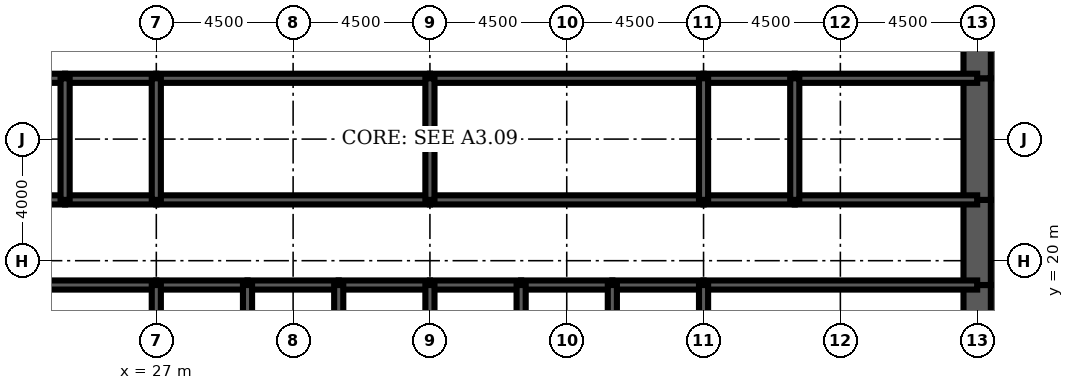
"""IFC4 building model, lengths in metres.
Left out: names, types, materials, properties, quantities, classifications, styles, units other than length and angle.
Written with IfcOpenShell. Run it as: python <this file> out.ifc"""

import sys

from ifc_helpers import new_model, si_unit, direction, frame, frame_2d, origin, place, context, subcontext, project, spatial, rectangle, extrude, element, fill, save


model = new_model("IFC4")
c1 = context("Model", 3, precision=1e-05, world=origin(), true_north=direction((0.0, 1.0)))
c2 = subcontext(c1, "Body", "Model", "MODEL_VIEW")
j1 = project(units=[si_unit("LENGTHUNIT", "METRE"), si_unit("PLANEANGLEUNIT", "RADIAN")], contexts=[c1])
p1 = place(None, origin())
s1 = spatial("IfcSite", under=j1, at=p1, CompositionType="ELEMENT")
p2 = place(p1, origin())
s2 = spatial("IfcBuilding", under=s1, at=p2, CompositionType="ELEMENT")
p3 = place(p2, frame((0.0, 0.0, 36.5)))
s3 = spatial("IfcBuildingStorey", under=s2, at=p3, CompositionType="ELEMENT", Elevation=36.5)
p4 = place(p3, frame((54.0, 16.0, 0.0), z_axis=(0.0, 0.0, 1.0), x_axis=(0.0, 1.0, 0.0)))
e1 = element("IfcWall", 1, at=p4, inside=s3, PredefinedType="SHEAR", context=c2, shape_type="SweptSolid", body=[
    extrude(rectangle(XDim=3.2, YDim=0.9, at=frame_2d((1.6, 0.0))), origin(), (0.0, 0.0, 1.0), 4.5),
])
p5 = place(p3, frame((54.0, 19.2, 0.0), z_axis=(0.0, 0.0, 1.0), x_axis=(0.0, 1.0, 0.0)))
e2 = element("IfcWall", 2, at=p5, inside=s3, PredefinedType="SHEAR", context=c2, shape_type="SweptSolid", body=[
    extrude(rectangle(XDim=2.8, YDim=0.9, at=frame_2d((1.4, 0.0))), origin(), (0.0, 0.0, 1.0), 4.5),
])
p6 = place(p5, frame((0.4, 0.0, 0.0)))
e3 = element("IfcOpeningElement", 3, at=p6, cuts=e2, PredefinedType="OPENING", context=c2, shape_type="SweptSolid", body=[
    extrude(rectangle(XDim=1.8, YDim=2.1, at=frame_2d((0.9, 1.05))), frame((0.0, 0.46, 0.0), z_axis=(0.0, -1.0, 0.0), x_axis=(1.0, 0.0, 0.0)), (0.0, 0.0, 1.0), 0.92),
])
p7 = place(p3, frame((54.0, 22.0, 0.0), z_axis=(0.0, 0.0, 1.0), x_axis=(0.0, 1.0, 0.0)))
e4 = element("IfcWall", 4, at=p7, inside=s3, PredefinedType="SHEAR", context=c2, shape_type="SweptSolid", body=[
    extrude(rectangle(XDim=4.0, YDim=0.9, at=frame_2d((2.0, 0.0))), origin(), (0.0, 0.0, 1.0), 4.5),
])
p8 = place(p3, frame((54.0, 26.0, 0.0), z_axis=(0.0, 0.0, 1.0), x_axis=(0.0, 1.0, 0.0)))
e5 = element("IfcWall", 5, at=p8, inside=s3, PredefinedType="SHEAR", context=c2, shape_type="SweptSolid", body=[
    extrude(rectangle(XDim=2.8, YDim=0.9, at=frame_2d((1.4, 0.0))), origin(), (0.0, 0.0, 1.0), 4.5),
])
p9 = place(p8, frame((0.6, 0.0, 0.0)))
e6 = element("IfcOpeningElement", 6, at=p9, cuts=e5, PredefinedType="OPENING", context=c2, shape_type="SweptSolid", body=[
    extrude(rectangle(XDim=1.8, YDim=2.1, at=frame_2d((0.9, 1.05))), frame((0.0, 0.46, 0.0), z_axis=(0.0, -1.0, 0.0), x_axis=(1.0, 0.0, 0.0)), (0.0, 0.0, 1.0), 0.92),
])
p10 = place(p3, frame((18.0, 19.2, 0.0), z_axis=(0.0, 0.0, 1.0), x_axis=(1.0, 0.0, 0.0)))
e7 = element("IfcWall", 7, at=p10, inside=s3, PredefinedType="SOLIDWALL", context=c2, shape_type="SweptSolid", body=[
    extrude(rectangle(XDim=9.0, YDim=0.3, at=frame_2d((4.5, 0.0))), origin(), (0.0, 0.0, 1.0), 4.5),
])
p11 = place(p10, frame((0.65, 0.0, 0.0)))
e8 = element("IfcOpeningElement", 8, at=p11, cuts=e7, PredefinedType="OPENING", context=c2, shape_type="SweptSolid", body=[
    extrude(rectangle(XDim=1.0, YDim=2.1, at=frame_2d((0.5, 1.05))), frame((0.0, 0.16, 0.0), z_axis=(0.0, -1.0, 0.0), x_axis=(1.0, 0.0, 0.0)), (0.0, 0.0, 1.0), 0.32),
])
p12 = place(p3, frame((27.0, 19.2, 0.0), z_axis=(0.0, 0.0, 1.0), x_axis=(1.0, 0.0, 0.0)))
e9 = element("IfcWall", 9, at=p12, inside=s3, PredefinedType="SOLIDWALL", context=c2, shape_type="SweptSolid", body=[
    extrude(rectangle(XDim=3.0, YDim=0.3, at=frame_2d((1.5, 0.0))), origin(), (0.0, 0.0, 1.0), 4.5),
])
p13 = place(p12, frame((0.95, 0.0, 0.0)))
e10 = element("IfcOpeningElement", 10, at=p13, cuts=e9, PredefinedType="OPENING", context=c2, shape_type="SweptSolid", body=[
    extrude(rectangle(XDim=1.1, YDim=2.2, at=frame_2d((0.55, 1.1))), frame((0.0, 0.16, 0.0), z_axis=(0.0, -1.0, 0.0), x_axis=(1.0, 0.0, 0.0)), (0.0, 0.0, 1.0), 0.32),
])
p14 = place(p3, frame((30.0, 19.2, 0.0), z_axis=(0.0, 0.0, 1.0), x_axis=(1.0, 0.0, 0.0)))
e11 = element("IfcWall", 11, at=p14, inside=s3, PredefinedType="SOLIDWALL", context=c2, shape_type="SweptSolid", body=[
    extrude(rectangle(XDim=3.0, YDim=0.3, at=frame_2d((1.5, 0.0))), origin(), (0.0, 0.0, 1.0), 4.5),
])
p15 = place(p14, frame((0.95, 0.0, 0.0)))
e12 = element("IfcOpeningElement", 12, at=p15, cuts=e11, PredefinedType="OPENING", context=c2, shape_type="SweptSolid", body=[
    extrude(rectangle(XDim=1.1, YDim=2.2, at=frame_2d((0.55, 1.1))), frame((0.0, 0.16, 0.0), z_axis=(0.0, -1.0, 0.0), x_axis=(1.0, 0.0, 0.0)), (0.0, 0.0, 1.0), 0.32),
])
p16 = place(p3, frame((33.0, 19.2, 0.0), z_axis=(0.0, 0.0, 1.0), x_axis=(1.0, 0.0, 0.0)))
e13 = element("IfcWall", 13, at=p16, inside=s3, PredefinedType="SOLIDWALL", context=c2, shape_type="SweptSolid", body=[
    extrude(rectangle(XDim=3.0, YDim=0.3, at=frame_2d((1.5, 0.0))), origin(), (0.0, 0.0, 1.0), 4.5),
])
p17 = place(p16, frame((0.95, 0.0, 0.0)))
e14 = element("IfcOpeningElement", 14, at=p17, cuts=e13, PredefinedType="OPENING", context=c2, shape_type="SweptSolid", body=[
    extrude(rectangle(XDim=1.1, YDim=2.2, at=frame_2d((0.55, 1.1))), frame((0.0, 0.16, 0.0), z_axis=(0.0, -1.0, 0.0), x_axis=(1.0, 0.0, 0.0)), (0.0, 0.0, 1.0), 0.32),
])
p18 = place(p3, frame((36.0, 19.2, 0.0), z_axis=(0.0, 0.0, 1.0), x_axis=(1.0, 0.0, 0.0)))
e15 = element("IfcWall", 15, at=p18, inside=s3, PredefinedType="SOLIDWALL", context=c2, shape_type="SweptSolid", body=[
    extrude(rectangle(XDim=3.0, YDim=0.3, at=frame_2d((1.5, 0.0))), origin(), (0.0, 0.0, 1.0), 4.5),
])
p19 = place(p18, frame((0.95, 0.0, 0.0)))
e16 = element("IfcOpeningElement", 16, at=p19, cuts=e15, PredefinedType="OPENING", context=c2, shape_type="SweptSolid", body=[
    extrude(rectangle(XDim=1.1, YDim=2.2, at=frame_2d((0.55, 1.1))), frame((0.0, 0.16, 0.0), z_axis=(0.0, -1.0, 0.0), x_axis=(1.0, 0.0, 0.0)), (0.0, 0.0, 1.0), 0.32),
])
for number, where, z_axis, x_axis in (
    (17, (39.0, 19.2, 0.0), (0.0, 0.0, 1.0), (1.0, 0.0, 0.0)),
    (18, (42.0, 19.2, 0.0), (0.0, 0.0, 1.0), (1.0, 0.0, 0.0)),
):
    element("IfcWall", number, at=place(p3, frame(where, z_axis=z_axis, x_axis=x_axis)), inside=s3, PredefinedType="SOLIDWALL", context=c2, shape_type="SweptSolid", body=[
        extrude(rectangle(XDim=3.0, YDim=0.3, at=frame_2d((1.5, 0.0))), origin(), (0.0, 0.0, 1.0), 4.5),
    ])
p20 = place(p3, frame((45.0, 19.2, 0.0), z_axis=(0.0, 0.0, 1.0), x_axis=(1.0, 0.0, 0.0)))
e19 = element("IfcWall", 19, at=p20, inside=s3, PredefinedType="SOLIDWALL", context=c2, shape_type="SweptSolid", body=[
    extrude(rectangle(XDim=9.0, YDim=0.3, at=frame_2d((4.5, 0.0))), origin(), (0.0, 0.0, 1.0), 4.5),
])
p21 = place(p20, frame((7.35, 0.0, 0.0)))
e20 = element("IfcOpeningElement", 20, at=p21, cuts=e19, PredefinedType="OPENING", context=c2, shape_type="SweptSolid", body=[
    extrude(rectangle(XDim=1.0, YDim=2.1, at=frame_2d((0.5, 1.05))), frame((0.0, 0.16, 0.0), z_axis=(0.0, -1.0, 0.0), x_axis=(1.0, 0.0, 0.0)), (0.0, 0.0, 1.0), 0.32),
])
p22 = place(p3, frame((18.0, 22.0, 0.0), z_axis=(0.0, 0.0, 1.0), x_axis=(1.0, 0.0, 0.0)))
e21 = element("IfcWall", 21, at=p22, inside=s3, PredefinedType="SOLIDWALL", context=c2, shape_type="SweptSolid", body=[
    extrude(rectangle(XDim=6.0, YDim=0.3, at=frame_2d((3.0, 0.0))), origin(), (0.0, 0.0, 1.0), 4.5),
])
p23 = place(p22, frame((2.0, 0.0, 0.0)))
e22 = element("IfcOpeningElement", 22, at=p23, cuts=e21, PredefinedType="OPENING", context=c2, shape_type="SweptSolid", body=[
    extrude(rectangle(XDim=1.0, YDim=2.1, at=frame_2d((0.5, 1.05))), frame((0.0, 0.16, 0.0), z_axis=(0.0, -1.0, 0.0), x_axis=(1.0, 0.0, 0.0)), (0.0, 0.0, 1.0), 0.32),
])
p24 = place(p3, frame((24.0, 22.0, 0.0), z_axis=(0.0, 0.0, 1.0), x_axis=(1.0, 0.0, 0.0)))
e23 = element("IfcWall", 23, at=p24, inside=s3, PredefinedType="SOLIDWALL", context=c2, shape_type="SweptSolid", body=[
    extrude(rectangle(XDim=3.0, YDim=0.3, at=frame_2d((1.5, 0.0))), origin(), (0.0, 0.0, 1.0), 4.5),
])
p25 = place(p24, frame((1.0, 0.0, 0.0)))
e24 = element("IfcOpeningElement", 24, at=p25, cuts=e23, PredefinedType="OPENING", context=c2, shape_type="SweptSolid", body=[
    extrude(rectangle(XDim=1.0, YDim=2.1, at=frame_2d((0.5, 1.05))), frame((0.0, 0.16, 0.0), z_axis=(0.0, -1.0, 0.0), x_axis=(1.0, 0.0, 0.0)), (0.0, 0.0, 1.0), 0.32),
])
p26 = place(p3, frame((27.0, 22.0, 0.0), z_axis=(0.0, 0.0, 1.0), x_axis=(1.0, 0.0, 0.0)))
e25 = element("IfcWall", 25, at=p26, inside=s3, PredefinedType="SOLIDWALL", context=c2, shape_type="SweptSolid", body=[
    extrude(rectangle(XDim=9.0, YDim=0.3, at=frame_2d((4.5, 0.0))), origin(), (0.0, 0.0, 1.0), 4.5),
])
p27 = place(p26, frame((4.0, 0.0, 0.0)))
e26 = element("IfcOpeningElement", 26, at=p27, cuts=e25, PredefinedType="OPENING", context=c2, shape_type="SweptSolid", body=[
    extrude(rectangle(XDim=1.0, YDim=2.1, at=frame_2d((0.5, 1.05))), frame((0.0, 0.16, 0.0), z_axis=(0.0, -1.0, 0.0), x_axis=(1.0, 0.0, 0.0)), (0.0, 0.0, 1.0), 0.32),
])
p28 = place(p3, frame((36.0, 22.0, 0.0), z_axis=(0.0, 0.0, 1.0), x_axis=(1.0, 0.0, 0.0)))
e27 = element("IfcWall", 27, at=p28, inside=s3, PredefinedType="SOLIDWALL", context=c2, shape_type="SweptSolid", body=[
    extrude(rectangle(XDim=9.0, YDim=0.3, at=frame_2d((4.5, 0.0))), origin(), (0.0, 0.0, 1.0), 4.5),
])
p29 = place(p28, frame((4.0, 0.0, 0.0)))
e28 = element("IfcOpeningElement", 28, at=p29, cuts=e27, PredefinedType="OPENING", context=c2, shape_type="SweptSolid", body=[
    extrude(rectangle(XDim=1.0, YDim=2.1, at=frame_2d((0.5, 1.05))), frame((0.0, 0.16, 0.0), z_axis=(0.0, -1.0, 0.0), x_axis=(1.0, 0.0, 0.0)), (0.0, 0.0, 1.0), 0.32),
])
p30 = place(p3, frame((45.0, 22.0, 0.0), z_axis=(0.0, 0.0, 1.0), x_axis=(1.0, 0.0, 0.0)))
e29 = element("IfcWall", 29, at=p30, inside=s3, PredefinedType="SOLIDWALL", context=c2, shape_type="SweptSolid", body=[
    extrude(rectangle(XDim=3.0, YDim=0.3, at=frame_2d((1.5, 0.0))), origin(), (0.0, 0.0, 1.0), 4.5),
])
p31 = place(p30, frame((1.0, 0.0, 0.0)))
e30 = element("IfcOpeningElement", 30, at=p31, cuts=e29, PredefinedType="OPENING", context=c2, shape_type="SweptSolid", body=[
    extrude(rectangle(XDim=1.0, YDim=2.1, at=frame_2d((0.5, 1.05))), frame((0.0, 0.16, 0.0), z_axis=(0.0, -1.0, 0.0), x_axis=(1.0, 0.0, 0.0)), (0.0, 0.0, 1.0), 0.32),
])
p32 = place(p3, frame((48.0, 22.0, 0.0), z_axis=(0.0, 0.0, 1.0), x_axis=(1.0, 0.0, 0.0)))
e31 = element("IfcWall", 31, at=p32, inside=s3, PredefinedType="SOLIDWALL", context=c2, shape_type="SweptSolid", body=[
    extrude(rectangle(XDim=6.0, YDim=0.3, at=frame_2d((3.0, 0.0))), origin(), (0.0, 0.0, 1.0), 4.5),
])
p33 = place(p32, frame((2.0, 0.0, 0.0)))
e32 = element("IfcOpeningElement", 32, at=p33, cuts=e31, PredefinedType="OPENING", context=c2, shape_type="SweptSolid", body=[
    extrude(rectangle(XDim=1.0, YDim=2.1, at=frame_2d((0.5, 1.05))), frame((0.0, 0.16, 0.0), z_axis=(0.0, -1.0, 0.0), x_axis=(1.0, 0.0, 0.0)), (0.0, 0.0, 1.0), 0.32),
])
p34 = place(p32, frame((4.15, 0.0, 0.0)))
e33 = element("IfcOpeningElement", 33, at=p34, cuts=e31, PredefinedType="OPENING", context=c2, shape_type="SweptSolid", body=[
    extrude(rectangle(XDim=1.0, YDim=2.1, at=frame_2d((0.5, 1.05))), frame((0.0, 0.16, 0.0), z_axis=(0.0, -1.0, 0.0), x_axis=(1.0, 0.0, 0.0)), (0.0, 0.0, 1.0), 0.32),
])
p35 = place(p3, frame((18.0, 26.0, 0.0), z_axis=(0.0, 0.0, 1.0), x_axis=(1.0, 0.0, 0.0)))
e34 = element("IfcWall", 34, at=p35, inside=s3, PredefinedType="SOLIDWALL", context=c2, shape_type="SweptSolid", body=[
    extrude(rectangle(XDim=6.0, YDim=0.3, at=frame_2d((3.0, 0.0))), origin(), (0.0, 0.0, 1.0), 4.5),
])
p36 = place(p3, frame((24.0, 26.0, 0.0), z_axis=(0.0, 0.0, 1.0), x_axis=(1.0, 0.0, 0.0)))
e35 = element("IfcWall", 35, at=p36, inside=s3, PredefinedType="SOLIDWALL", context=c2, shape_type="SweptSolid", body=[
    extrude(rectangle(XDim=3.0, YDim=0.3, at=frame_2d((1.5, 0.0))), origin(), (0.0, 0.0, 1.0), 4.5),
])
for number, where, z_axis, x_axis in (
    (36, (27.0, 26.0, 0.0), (0.0, 0.0, 1.0), (1.0, 0.0, 0.0)),
    (37, (36.0, 26.0, 0.0), (0.0, 0.0, 1.0), (1.0, 0.0, 0.0)),
):
    element("IfcWall", number, at=place(p3, frame(where, z_axis=z_axis, x_axis=x_axis)), inside=s3, PredefinedType="SOLIDWALL", context=c2, shape_type="SweptSolid", body=[
        extrude(rectangle(XDim=9.0, YDim=0.3, at=frame_2d((4.5, 0.0))), origin(), (0.0, 0.0, 1.0), 4.5),
    ])
p37 = place(p3, frame((45.0, 26.0, 0.0), z_axis=(0.0, 0.0, 1.0), x_axis=(1.0, 0.0, 0.0)))
e38 = element("IfcWall", 38, at=p37, inside=s3, PredefinedType="SOLIDWALL", context=c2, shape_type="SweptSolid", body=[
    extrude(rectangle(XDim=3.0, YDim=0.3, at=frame_2d((1.5, 0.0))), origin(), (0.0, 0.0, 1.0), 4.5),
])
p38 = place(p3, frame((48.0, 26.0, 0.0), z_axis=(0.0, 0.0, 1.0), x_axis=(1.0, 0.0, 0.0)))
e39 = element("IfcWall", 39, at=p38, inside=s3, PredefinedType="SOLIDWALL", context=c2, shape_type="SweptSolid", body=[
    extrude(rectangle(XDim=6.0, YDim=0.3, at=frame_2d((3.0, 0.0))), origin(), (0.0, 0.0, 1.0), 4.5),
])
for number, where, z_axis, x_axis in (
    (40, (27.0, 16.0, 0.0), (0.0, 0.0, 1.0), (0.0, 1.0, 0.0)),
    (41, (30.0, 16.0, 0.0), (0.0, 0.0, 1.0), (0.0, 1.0, 0.0)),
    (42, (33.0, 16.0, 0.0), (0.0, 0.0, 1.0), (0.0, 1.0, 0.0)),
    (43, (36.0, 16.0, 0.0), (0.0, 0.0, 1.0), (0.0, 1.0, 0.0)),
    (44, (39.0, 16.0, 0.0), (0.0, 0.0, 1.0), (0.0, 1.0, 0.0)),
    (45, (42.0, 16.0, 0.0), (0.0, 0.0, 1.0), (0.0, 1.0, 0.0)),
    (46, (45.0, 16.0, 0.0), (0.0, 0.0, 1.0), (0.0, 1.0, 0.0)),
):
    element("IfcWall", number, at=place(p3, frame(where, z_axis=z_axis, x_axis=x_axis)), inside=s3, PredefinedType="SOLIDWALL", context=c2, shape_type="SweptSolid", body=[
        extrude(rectangle(XDim=3.2, YDim=0.3, at=frame_2d((1.6, 0.0))), origin(), (0.0, 0.0, 1.0), 4.5),
    ])
for number, where, z_axis, x_axis in (
    (47, (24.0, 22.0, 0.0), (0.0, 0.0, 1.0), (0.0, 1.0, 0.0)),
    (48, (27.0, 22.0, 0.0), (0.0, 0.0, 1.0), (0.0, 1.0, 0.0)),
    (49, (36.0, 22.0, 0.0), (0.0, 0.0, 1.0), (0.0, 1.0, 0.0)),
    (50, (45.0, 22.0, 0.0), (0.0, 0.0, 1.0), (0.0, 1.0, 0.0)),
    (51, (48.0, 22.0, 0.0), (0.0, 0.0, 1.0), (0.0, 1.0, 0.0)),
):
    element("IfcWall", number, at=place(p3, frame(where, z_axis=z_axis, x_axis=x_axis)), inside=s3, PredefinedType="SOLIDWALL", context=c2, shape_type="SweptSolid", body=[
        extrude(rectangle(XDim=4.0, YDim=0.3, at=frame_2d((2.0, 0.0))), origin(), (0.0, 0.0, 1.0), 4.5),
    ])
p39 = place(p3, frame((38.5, 22.15, 0.0), z_axis=(0.0, 0.0, 1.0), x_axis=(0.0, 1.0, 0.0)))
e52 = element("IfcWall", 52, at=p39, inside=s3, PredefinedType="PARTITIONING", context=c2, shape_type="SweptSolid", body=[
    extrude(rectangle(XDim=3.7, YDim=0.15, at=frame_2d((1.85, 0.0))), origin(), (0.0, 0.0, 1.0), 3.0),
])
p40 = place(p39, frame((2.2, 0.0, 0.0)))
e53 = element("IfcOpeningElement", 53, at=p40, cuts=e52, PredefinedType="OPENING", context=c2, shape_type="SweptSolid", body=[
    extrude(rectangle(XDim=1.0, YDim=2.1, at=frame_2d((0.5, 1.05))), frame((0.0, 0.085, 0.0), z_axis=(0.0, -1.0, 0.0), x_axis=(1.0, 0.0, 0.0)), (0.0, 0.0, 1.0), 0.17),
])
p41 = place(p3, frame((51.675, 22.15, 0.0), z_axis=(0.0, 0.0, 1.0), x_axis=(0.0, 1.0, 0.0)))
e54 = element("IfcWall", 54, at=p41, inside=s3, PredefinedType="PARTITIONING", context=c2, shape_type="SweptSolid", body=[
    extrude(rectangle(XDim=3.7, YDim=0.15, at=frame_2d((1.85, 0.0))), origin(), (0.0, 0.0, 1.0), 3.0),
])
p42 = place(p3, frame((47.7, 26.15, 0.0), z_axis=(0.0, 0.0, 1.0), x_axis=(0.0, 1.0, 0.0)))
e55 = element("IfcWall", 55, at=p42, inside=s3, PredefinedType="PARTITIONING", context=c2, shape_type="SweptSolid", body=[
    extrude(rectangle(XDim=2.5, YDim=0.15, at=frame_2d((1.25, 0.0))), origin(), (0.0, 0.0, 1.0), 3.0),
])
p43 = place(p42, frame((1.15, 0.0, 0.0)))
e56 = element("IfcOpeningElement", 56, at=p43, cuts=e55, PredefinedType="OPENING", context=c2, shape_type="SweptSolid", body=[
    extrude(rectangle(XDim=1.0, YDim=2.1, at=frame_2d((0.5, 1.05))), frame((0.0, 0.085, 0.0), z_axis=(0.0, -1.0, 0.0), x_axis=(1.0, 0.0, 0.0)), (0.0, 0.0, 1.0), 0.17),
])
p44 = place(p3, frame((24.5, 19.35, 0.0), z_axis=(0.0, 0.0, 1.0), x_axis=(0.0, 1.0, 0.0)))
e57 = element("IfcWall", 57, at=p44, inside=s3, PredefinedType="PARTITIONING", context=c2, shape_type="SweptSolid", body=[
    extrude(rectangle(XDim=2.5, YDim=0.15, at=frame_2d((1.25, 0.0))), origin(), (0.0, 0.0, 1.0), 3.0),
])
p45 = place(p44, frame((1.15, 0.0, 0.0)))
e58 = element("IfcOpeningElement", 58, at=p45, cuts=e57, PredefinedType="OPENING", context=c2, shape_type="SweptSolid", body=[
    extrude(rectangle(XDim=1.0, YDim=2.1, at=frame_2d((0.5, 1.05))), frame((0.0, 0.085, 0.0), z_axis=(0.0, -1.0, 0.0), x_axis=(1.0, 0.0, 0.0)), (0.0, 0.0, 1.0), 0.17),
])
p46 = place(p40, origin())
e59 = element("IfcDoor", 59, at=p46, inside=s3, OperationType="SINGLE_SWING_RIGHT", PredefinedType="DOOR", context=c2, shape_type="SweptSolid", body=[
    extrude(rectangle(XDim=1.0, YDim=2.1, at=frame_2d((0.5, 1.05))), frame((0.0, 0.025, 0.0), z_axis=(0.0, -1.0, 0.0), x_axis=(1.0, 0.0, 0.0)), (0.0, 0.0, 1.0), 0.05),
])
fill(e53, e59)
p47 = place(p45, origin())
e60 = element("IfcDoor", 60, at=p47, inside=s3, OperationType="SINGLE_SWING_RIGHT", PredefinedType="DOOR", context=c2, shape_type="SweptSolid", body=[
    extrude(rectangle(XDim=1.0, YDim=2.1, at=frame_2d((0.5, 1.05))), frame((0.0, 0.025, 0.0), z_axis=(0.0, -1.0, 0.0), x_axis=(1.0, 0.0, 0.0)), (0.0, 0.0, 1.0), 0.05),
])
fill(e58, e60)
p48 = place(p13, origin())
e61 = element("IfcDoor", 61, at=p48, inside=s3, OperationType="DOUBLE_DOOR_SLIDING", PredefinedType="USERDEFINED", context=c2, shape_type="SweptSolid", body=[
    extrude(rectangle(XDim=1.1, YDim=2.2, at=frame_2d((0.55, 1.1))), frame((0.0, 0.025, 0.0), z_axis=(0.0, -1.0, 0.0), x_axis=(1.0, 0.0, 0.0)), (0.0, 0.0, 1.0), 0.05),
])
fill(e10, e61)
p49 = place(p15, origin())
e62 = element("IfcDoor", 62, at=p49, inside=s3, OperationType="DOUBLE_DOOR_SLIDING", PredefinedType="USERDEFINED", context=c2, shape_type="SweptSolid", body=[
    extrude(rectangle(XDim=1.1, YDim=2.2, at=frame_2d((0.55, 1.1))), frame((0.0, 0.025, 0.0), z_axis=(0.0, -1.0, 0.0), x_axis=(1.0, 0.0, 0.0)), (0.0, 0.0, 1.0), 0.05),
])
fill(e12, e62)
p50 = place(p17, origin())
e63 = element("IfcDoor", 63, at=p50, inside=s3, OperationType="DOUBLE_DOOR_SLIDING", PredefinedType="USERDEFINED", context=c2, shape_type="SweptSolid", body=[
    extrude(rectangle(XDim=1.1, YDim=2.2, at=frame_2d((0.55, 1.1))), frame((0.0, 0.025, 0.0), z_axis=(0.0, -1.0, 0.0), x_axis=(1.0, 0.0, 0.0)), (0.0, 0.0, 1.0), 0.05),
])
fill(e14, e63)
p51 = place(p19, origin())
e64 = element("IfcDoor", 64, at=p51, inside=s3, OperationType="DOUBLE_DOOR_SLIDING", PredefinedType="USERDEFINED", context=c2, shape_type="SweptSolid", body=[
    extrude(rectangle(XDim=1.1, YDim=2.2, at=frame_2d((0.55, 1.1))), frame((0.0, 0.025, 0.0), z_axis=(0.0, -1.0, 0.0), x_axis=(1.0, 0.0, 0.0)), (0.0, 0.0, 1.0), 0.05),
])
fill(e16, e64)
p52 = place(p21, origin())
e65 = element("IfcDoor", 65, at=p52, inside=s3, OperationType="SINGLE_SWING_RIGHT", PredefinedType="DOOR", context=c2, shape_type="SweptSolid", body=[
    extrude(rectangle(XDim=1.0, YDim=2.1, at=frame_2d((0.5, 1.05))), frame((0.0, 0.025, 0.0), z_axis=(0.0, -1.0, 0.0), x_axis=(1.0, 0.0, 0.0)), (0.0, 0.0, 1.0), 0.05),
])
fill(e20, e65)
p53 = place(p6, origin())
e66 = element("IfcDoor", 66, at=p53, inside=s3, OperationType="SINGLE_SWING_LEFT", PredefinedType="DOOR", context=c2, shape_type="SweptSolid", body=[
    extrude(rectangle(XDim=1.8, YDim=2.1, at=frame_2d((0.9, 1.05))), frame((0.0, 0.45, 0.0), z_axis=(0.0, -1.0, 0.0), x_axis=(1.0, 0.0, 0.0)), (0.0, 0.0, 1.0), 0.899),
])
fill(e3, e66)
p54 = place(p9, origin())
e67 = element("IfcDoor", 67, at=p54, inside=s3, OperationType="SINGLE_SWING_LEFT", PredefinedType="DOOR", context=c2, shape_type="SweptSolid", body=[
    extrude(rectangle(XDim=1.8, YDim=2.1, at=frame_2d((0.9, 1.05))), frame((0.0, 0.45, 0.0), z_axis=(0.0, -1.0, 0.0), x_axis=(1.0, 0.0, 0.0)), (0.0, 0.0, 1.0), 0.899),
])
fill(e6, e67)
p55 = place(p25, origin())
e68 = element("IfcDoor", 68, at=p55, inside=s3, OperationType="SINGLE_SWING_LEFT", PredefinedType="DOOR", context=c2, shape_type="SweptSolid", body=[
    extrude(rectangle(XDim=1.0, YDim=2.1, at=frame_2d((0.5, 1.05))), frame((0.0, 0.025, 0.0), z_axis=(0.0, -1.0, 0.0), x_axis=(1.0, 0.0, 0.0)), (0.0, 0.0, 1.0), 0.05),
])
fill(e24, e68)
p56 = place(p27, origin())
e69 = element("IfcDoor", 69, at=p56, inside=s3, OperationType="SINGLE_SWING_LEFT", PredefinedType="DOOR", context=c2, shape_type="SweptSolid", body=[
    extrude(rectangle(XDim=1.0, YDim=2.1, at=frame_2d((0.5, 1.05))), frame((0.0, 0.025, 0.0), z_axis=(0.0, -1.0, 0.0), x_axis=(1.0, 0.0, 0.0)), (0.0, 0.0, 1.0), 0.05),
])
fill(e26, e69)
p57 = place(p29, origin())
e70 = element("IfcDoor", 70, at=p57, inside=s3, OperationType="SINGLE_SWING_LEFT", PredefinedType="DOOR", context=c2, shape_type="SweptSolid", body=[
    extrude(rectangle(XDim=1.0, YDim=2.1, at=frame_2d((0.5, 1.05))), frame((0.0, 0.025, 0.0), z_axis=(0.0, -1.0, 0.0), x_axis=(1.0, 0.0, 0.0)), (0.0, 0.0, 1.0), 0.05),
])
fill(e28, e70)
p58 = place(p31, origin())
e71 = element("IfcDoor", 71, at=p58, inside=s3, OperationType="SINGLE_SWING_LEFT", PredefinedType="DOOR", context=c2, shape_type="SweptSolid", body=[
    extrude(rectangle(XDim=1.0, YDim=2.1, at=frame_2d((0.5, 1.05))), frame((0.0, 0.025, 0.0), z_axis=(0.0, -1.0, 0.0), x_axis=(1.0, 0.0, 0.0)), (0.0, 0.0, 1.0), 0.05),
])
fill(e30, e71)
p59 = place(p33, origin())
e72 = element("IfcDoor", 72, at=p59, inside=s3, OperationType="SINGLE_SWING_LEFT", PredefinedType="DOOR", context=c2, shape_type="SweptSolid", body=[
    extrude(rectangle(XDim=1.0, YDim=2.1, at=frame_2d((0.5, 1.05))), frame((0.0, 0.025, 0.0), z_axis=(0.0, -1.0, 0.0), x_axis=(1.0, 0.0, 0.0)), (0.0, 0.0, 1.0), 0.05),
])
fill(e32, e72)
p60 = place(p34, origin())
e73 = element("IfcDoor", 73, at=p60, inside=s3, OperationType="SINGLE_SWING_RIGHT", PredefinedType="DOOR", context=c2, shape_type="SweptSolid", body=[
    extrude(rectangle(XDim=1.0, YDim=2.1, at=frame_2d((0.5, 1.05))), frame((0.0, 0.025, 0.0), z_axis=(0.0, -1.0, 0.0), x_axis=(1.0, 0.0, 0.0)), (0.0, 0.0, 1.0), 0.05),
])
fill(e33, e73)
save(model, sys.argv[1])
